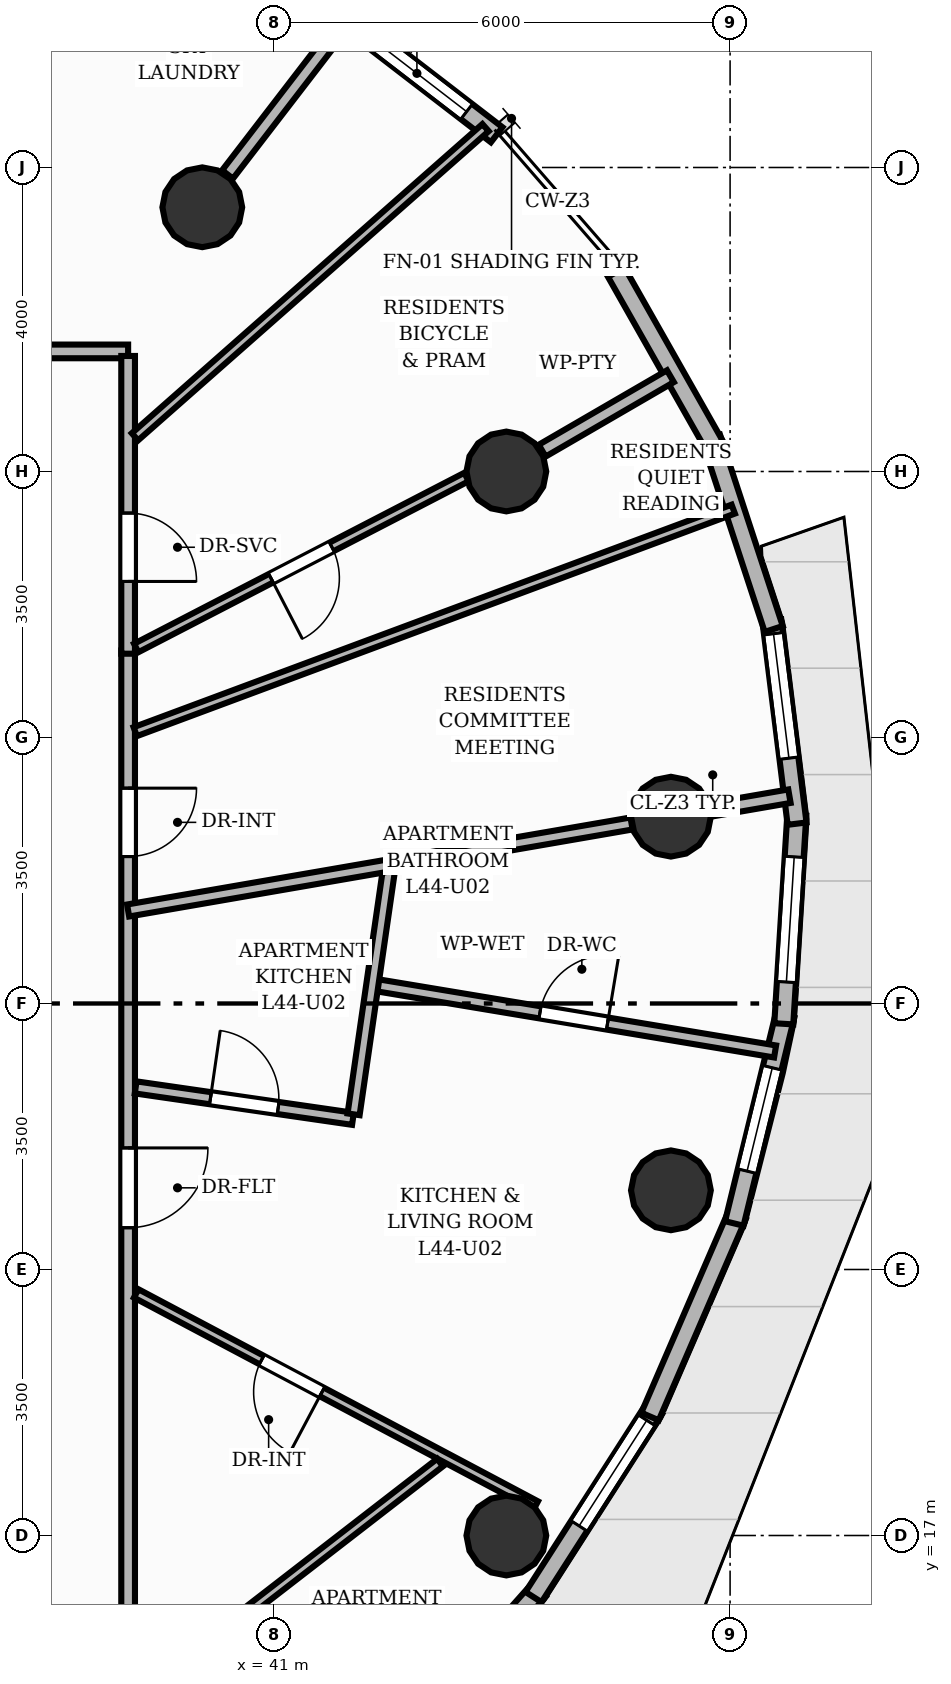
"""IFC4 building model, lengths in metres.
Left out: names, types, materials, properties, quantities, classifications, styles, units other than length and angle.
Written with IfcOpenShell. Run it as: python <this file> out.ifc"""

import sys

from ifc_helpers import new_model, si_unit, direction, frame, frame_2d, origin, origin_2d, place, context, subcontext, project, spatial, rectangle, circle, extrude, element, fill, save


model = new_model("IFC4")
c1 = context("Model", 3, precision=1e-05, world=origin(), true_north=direction((0.0, 1.0)))
c2 = subcontext(c1, "Body", "Model", "MODEL_VIEW")
j1 = project(units=[si_unit("LENGTHUNIT", "METRE"), si_unit("PLANEANGLEUNIT", "RADIAN")], contexts=[c1])
p1 = place(None, origin())
s1 = spatial("IfcSite", under=j1, at=p1, CompositionType="ELEMENT")
p2 = place(p1, origin())
s2 = spatial("IfcBuilding", under=s1, at=p2, CompositionType="ELEMENT")
p3 = place(p2, frame((0.0, 0.0, 148.96)))
s3 = spatial("IfcBuildingStorey", under=s2, at=p3, CompositionType="ELEMENT", Elevation=148.96)
for number, where, z_axis, x_axis in (
    (1, (46.221, 26.458, 0.0), (0.0, 0.0, 1.0), (1.0, 0.0, 0.0)),
    (2, (44.056, 31.0, 0.0), (0.0, 0.0, 1.0), (1.0, 0.0, 0.0)),
    (3, (40.056, 34.477, 0.0), (0.0, 0.0, 1.0), (1.0, 0.0, 0.0)),
    (4, (44.056, 17.0, 0.0), (0.0, 0.0, 1.0), (1.0, 0.0, 0.0)),
    (5, (46.221, 21.542, 0.0), (0.0, 0.0, 1.0), (1.0, 0.0, 0.0)),
):
    element("IfcColumn", number, at=place(p3, frame(where, z_axis=z_axis, x_axis=x_axis)), inside=s3, PredefinedType="COLUMN", context=c2, shape_type="SweptSolid", body=[
        extrude(circle(Radius=0.525, at=origin_2d()), origin(), (0.0, 0.0, 1.0), 3.2),
    ])
p4 = place(p3, frame((41.831, 37.046, 0.0), z_axis=(0.0, 0.0, 1.0), x_axis=(0.7923805969, -0.610027040103, 0.0)))
e6 = element("IfcWall", 6, at=p4, inside=s3, PredefinedType="SOLIDWALL", context=c2, shape_type="SweptSolid", body=[
    extrude(rectangle(XDim=2.648, YDim=0.25, at=frame_2d((1.324, 0.0))), origin(), (0.0, 0.0, 1.0), 2.96),
])
p5 = place(p4, frame((0.499, 0.0, 0.85)))
e7 = element("IfcOpeningElement", 7, at=p5, cuts=e6, PredefinedType="OPENING", context=c2, shape_type="SweptSolid", body=[
    extrude(rectangle(XDim=1.65, YDim=1.55, at=frame_2d((0.825, 0.775))), frame((0.0, 0.135, 0.0), z_axis=(0.0, -1.0, 0.0), x_axis=(1.0, 0.0, 0.0)), (0.0, 0.0, 1.0), 0.27),
])
p6 = place(p3, frame((44.48, 16.277, 0.0), z_axis=(0.0, 0.0, 1.0), x_axis=(-0.664002369324, -0.747730468506, 0.0)))
e8 = element("IfcWall", 8, at=p6, inside=s3, PredefinedType="SOLIDWALL", context=c2, shape_type="SweptSolid", body=[
    extrude(rectangle(XDim=2.977, YDim=0.25, at=frame_2d((1.489, 0.0))), origin(), (0.0, 0.0, 1.0), 2.96),
])
p7 = place(p3, frame((45.998, 18.663, 0.0), z_axis=(0.0, 0.0, 1.0), x_axis=(-0.539492373821, -0.841990486044, 0.0)))
e9 = element("IfcWall", 9, at=p7, inside=s3, PredefinedType="SOLIDWALL", context=c2, shape_type="SweptSolid", body=[
    extrude(rectangle(XDim=2.937, YDim=0.25, at=frame_2d((1.469, 0.0))), origin(), (0.0, 0.0, 1.0), 2.96),
])
p8 = place(p7, frame((0.175, 0.0, 0.85)))
e10 = element("IfcOpeningElement", 10, at=p8, cuts=e9, PredefinedType="OPENING", context=c2, shape_type="SweptSolid", body=[
    extrude(rectangle(XDim=1.65, YDim=1.55, at=frame_2d((0.825, 0.775))), frame((0.0, 0.135, 0.0), z_axis=(0.0, -1.0, 0.0), x_axis=(1.0, 0.0, 0.0)), (0.0, 0.0, 1.0), 0.27),
])
p9 = place(p3, frame((47.091, 21.211, 0.0), z_axis=(0.0, 0.0, 1.0), x_axis=(-0.397015319193, -0.917811983102, 0.0)))
e11 = element("IfcWall", 11, at=p9, inside=s3, PredefinedType="SOLIDWALL", context=c2, shape_type="SweptSolid", body=[
    extrude(rectangle(XDim=2.882, YDim=0.25, at=frame_2d((1.441, 0.0))), origin(), (0.0, 0.0, 1.0), 2.96),
])
p10 = place(p3, frame((47.723, 23.843, 0.0), z_axis=(0.0, 0.0, 1.0), x_axis=(-0.236986101123, -0.971513040507, 0.0)))
e12 = element("IfcWall", 12, at=p10, inside=s3, PredefinedType="SOLIDWALL", context=c2, shape_type="SweptSolid", body=[
    extrude(rectangle(XDim=2.818, YDim=0.25, at=frame_2d((1.409, 0.0))), origin(), (0.0, 0.0, 1.0), 2.96),
])
p11 = place(p10, frame((0.709, 0.0, 0.85)))
e13 = element("IfcOpeningElement", 13, at=p11, cuts=e12, PredefinedType="OPENING", context=c2, shape_type="SweptSolid", body=[
    extrude(rectangle(XDim=1.4, YDim=1.55, at=frame_2d((0.7, 0.775))), frame((0.0, 0.135, 0.0), z_axis=(0.0, -1.0, 0.0), x_axis=(1.0, 0.0, 0.0)), (0.0, 0.0, 1.0), 0.27),
])
p12 = place(p3, frame((47.878, 26.479, 0.0), z_axis=(0.0, 0.0, 1.0), x_axis=(-0.062278868317, -0.998058787127, 0.0)))
e14 = element("IfcWall", 14, at=p12, inside=s3, PredefinedType="SOLIDWALL", context=c2, shape_type="SweptSolid", body=[
    extrude(rectangle(XDim=2.752, YDim=0.25, at=frame_2d((1.376, 0.0))), origin(), (0.0, 0.0, 1.0), 2.96),
])
p13 = place(p12, frame((0.551, 0.0, 0.85)))
e15 = element("IfcOpeningElement", 15, at=p13, cuts=e14, PredefinedType="OPENING", context=c2, shape_type="SweptSolid", body=[
    extrude(rectangle(XDim=1.65, YDim=1.55, at=frame_2d((0.825, 0.775))), frame((0.0, 0.135, 0.0), z_axis=(0.0, -1.0, 0.0), x_axis=(1.0, 0.0, 0.0)), (0.0, 0.0, 1.0), 0.27),
])
p14 = place(p3, frame((47.549, 29.039, 0.0), z_axis=(0.0, 0.0, 1.0), x_axis=(0.123197890413, -0.992382123881, 0.0)))
e16 = element("IfcWall", 16, at=p14, inside=s3, PredefinedType="SOLIDWALL", context=c2, shape_type="SweptSolid", body=[
    extrude(rectangle(XDim=2.693, YDim=0.25, at=frame_2d((1.347, 0.0))), origin(), (0.0, 0.0, 1.0), 2.96),
])
p15 = place(p14, frame((0.175, 0.0, 0.85)))
e17 = element("IfcOpeningElement", 17, at=p15, cuts=e16, PredefinedType="OPENING", context=c2, shape_type="SweptSolid", body=[
    extrude(rectangle(XDim=1.65, YDim=1.55, at=frame_2d((0.825, 0.775))), frame((0.0, 0.135, 0.0), z_axis=(0.0, -1.0, 0.0), x_axis=(1.0, 0.0, 0.0)), (0.0, 0.0, 1.0), 0.27),
])
p16 = place(p3, frame((46.749, 31.444, 0.0), z_axis=(0.0, 0.0, 1.0), x_axis=(0.311522010952, -0.950238936633, 0.0)))
e18 = element("IfcWall", 18, at=p16, inside=s3, PredefinedType="SOLIDWALL", context=c2, shape_type="SweptSolid", body=[
    extrude(rectangle(XDim=2.648, YDim=0.25, at=frame_2d((1.324, 0.0))), origin(), (0.0, 0.0, 1.0), 2.96),
])
p17 = place(p3, frame((45.502, 33.623, 0.0), z_axis=(0.0, 0.0, 1.0), x_axis=(0.492909281161, -0.870080709214, 0.0)))
e19 = element("IfcWall", 19, at=p17, inside=s3, PredefinedType="SOLIDWALL", context=c2, shape_type="SweptSolid", body=[
    extrude(rectangle(XDim=2.624, YDim=0.25, at=frame_2d((1.312, 0.0))), origin(), (0.0, 0.0, 1.0), 2.96),
])
p18 = place(p3, frame((46.758, 26.551, 0.0), z_axis=(0.0, 0.0, 1.0), x_axis=(0.985390767806, 0.170308645474, 0.0)))
e20 = element("IfcWall", 20, at=p18, inside=s3, PredefinedType="PARTITIONING", context=c2, shape_type="SweptSolid", body=[
    extrude(rectangle(XDim=1.038, YDim=0.18, at=frame_2d((0.519, 0.0))), origin(), (0.0, 0.0, 1.0), 2.336),
])
p19 = place(p3, frame((44.528, 31.274, 0.0), z_axis=(0.0, 0.0, 1.0), x_axis=(0.864802971131, 0.502111363268, 0.0)))
e21 = element("IfcWall", 21, at=p19, inside=s3, PredefinedType="PARTITIONING", context=c2, shape_type="SweptSolid", body=[
    extrude(rectangle(XDim=1.951, YDim=0.18, at=frame_2d((0.975, 0.0))), origin(), (0.0, 0.0, 1.0), 2.336),
])
p20 = place(p3, frame((40.388, 34.908, 0.0), z_axis=(0.0, 0.0, 1.0), x_axis=(0.609556175004, 0.792742877303, 0.0)))
e22 = element("IfcWall", 22, at=p20, inside=s3, PredefinedType="PARTITIONING", context=c2, shape_type="SweptSolid", body=[
    extrude(rectangle(XDim=2.519, YDim=0.18, at=frame_2d((1.259, 0.0))), origin(), (0.0, 0.0, 1.0), 2.336),
])
p21 = place(p3, frame((39.08, 28.645, 0.0), z_axis=(0.0, 0.0, 1.0), x_axis=(0.0, -1.0, 0.0)))
e23 = element("IfcWall", 23, at=p21, inside=s3, PredefinedType="PARTITIONING", context=c2, shape_type="SweptSolid", body=[
    extrude(rectangle(XDim=13.225, YDim=0.18, at=frame_2d((6.613, 0.0))), origin(), (0.0, 0.0, 1.0), 2.955),
])
p22 = place(p21, frame((6.545, 0.0, 0.0)))
e24 = element("IfcOpeningElement", 24, at=p22, cuts=e23, PredefinedType="OPENING", context=c2, shape_type="SweptSolid", body=[
    extrude(rectangle(XDim=1.05, YDim=2.15, at=frame_2d((0.525, 1.075))), frame((0.0, 0.1, 0.0), z_axis=(0.0, -1.0, 0.0), x_axis=(1.0, 0.0, 0.0)), (0.0, 0.0, 1.0), 0.2),
])
p23 = place(p21, frame((1.812, 0.0, 0.0)))
e25 = element("IfcOpeningElement", 25, at=p23, cuts=e23, PredefinedType="OPENING", context=c2, shape_type="SweptSolid", body=[
    extrude(rectangle(XDim=0.9, YDim=2.1, at=frame_2d((0.45, 1.05))), frame((0.0, 0.1, 0.0), z_axis=(0.0, -1.0, 0.0), x_axis=(1.0, 0.0, 0.0)), (0.0, 0.0, 1.0), 0.2),
])
p24 = place(p3, frame((21.42, 32.58, 0.0), z_axis=(0.0, 0.0, 1.0), x_axis=(1.0, 0.0, 0.0)))
e26 = element("IfcWall", 26, at=p24, inside=s3, PredefinedType="PARTITIONING", context=c2, shape_type="SweptSolid", body=[
    extrude(rectangle(XDim=17.66, YDim=0.18, at=frame_2d((8.83, 0.0))), origin(), (0.0, 0.0, 1.0), 2.955),
])
p25 = place(p24, frame((13.001, 0.0, 0.0)))
e27 = element("IfcOpeningElement", 27, at=p25, cuts=e26, PredefinedType="OPENING", context=c2, shape_type="SweptSolid", body=[
    extrude(rectangle(XDim=0.9, YDim=2.1, at=frame_2d((0.45, 1.05))), frame((0.0, 0.1, 0.0), z_axis=(0.0, -1.0, 0.0), x_axis=(1.0, 0.0, 0.0)), (0.0, 0.0, 1.0), 0.2),
])
p26 = place(p24, frame((15.547, 0.0, 0.0)))
e28 = element("IfcOpeningElement", 28, at=p26, cuts=e26, PredefinedType="OPENING", context=c2, shape_type="SweptSolid", body=[
    extrude(rectangle(XDim=0.9, YDim=2.1, at=frame_2d((0.45, 1.05))), frame((0.0, 0.1, 0.0), z_axis=(0.0, -1.0, 0.0), x_axis=(1.0, 0.0, 0.0)), (0.0, 0.0, 1.0), 0.2),
])
p27 = place(p24, frame((5.757, 0.0, 0.0)))
e29 = element("IfcOpeningElement", 29, at=p27, cuts=e26, PredefinedType="OPENING", context=c2, shape_type="SweptSolid", body=[
    extrude(rectangle(XDim=1.05, YDim=2.15, at=frame_2d((0.525, 1.075))), frame((0.0, 0.1, 0.0), z_axis=(0.0, -1.0, 0.0), x_axis=(1.0, 0.0, 0.0)), (0.0, 0.0, 1.0), 0.2),
])
p28 = place(p3, frame((39.08, 32.52, 0.0), z_axis=(0.0, 0.0, 1.0), x_axis=(0.0, -1.0, 0.0)))
e30 = element("IfcWall", 30, at=p28, inside=s3, PredefinedType="PARTITIONING", context=c2, shape_type="SweptSolid", body=[
    extrude(rectangle(XDim=3.918, YDim=0.18, at=frame_2d((1.959, 0.0))), origin(), (0.0, 0.0, 1.0), 2.955),
])
p29 = place(p28, frame((2.067, 0.0, 0.0)))
e31 = element("IfcOpeningElement", 31, at=p29, cuts=e30, PredefinedType="OPENING", context=c2, shape_type="SweptSolid", body=[
    extrude(rectangle(XDim=0.9, YDim=2.1, at=frame_2d((0.45, 1.05))), frame((0.0, 0.1, 0.0), z_axis=(0.0, -1.0, 0.0), x_axis=(1.0, 0.0, 0.0)), (0.0, 0.0, 1.0), 0.2),
])
p30 = place(p3, frame((42.294, 24.25, 0.0), z_axis=(0.0, 0.0, 1.0), x_axis=(0.986430753195, -0.164177858287, 0.0)))
e32 = element("IfcWall", 32, at=p30, inside=s3, PredefinedType="PLUMBINGWALL", context=c2, shape_type="SweptSolid", body=[
    extrude(rectangle(XDim=5.371, YDim=0.16, at=frame_2d((2.686, 0.0))), origin(), (0.0, 0.0, 1.0), 2.955),
])
p31 = place(p30, frame((2.236, 0.0, 0.0)))
e33 = element("IfcOpeningElement", 33, at=p31, cuts=e32, PredefinedType="OPENING", context=c2, shape_type="SweptSolid", body=[
    extrude(rectangle(XDim=0.9, YDim=2.1, at=frame_2d((0.45, 1.05))), frame((0.0, 0.09, 0.0), z_axis=(0.0, -1.0, 0.0), x_axis=(1.0, 0.0, 0.0)), (0.0, 0.0, 1.0), 0.18),
])
p32 = place(p3, frame((44.443, 17.395, 0.0), z_axis=(0.0, 0.0, 1.0), x_axis=(-0.883258541518, 0.468886285612, 0.0)))
e34 = element("IfcWall", 34, at=p32, inside=s3, PredefinedType="PARTITIONING", context=c2, shape_type="SweptSolid", body=[
    extrude(rectangle(XDim=5.952, YDim=0.125, at=frame_2d((2.976, 0.0))), origin(), (0.0, 0.0, 1.0), 2.955),
])
p33 = place(p32, frame((3.184, 0.0, 0.0)))
e35 = element("IfcOpeningElement", 35, at=p33, cuts=e34, PredefinedType="OPENING", context=c2, shape_type="SweptSolid", body=[
    extrude(rectangle(XDim=0.9, YDim=2.1, at=frame_2d((0.45, 1.05))), frame((0.0, 0.073, 0.0), z_axis=(0.0, -1.0, 0.0), x_axis=(1.0, 0.0, 0.0)), (0.0, 0.0, 1.0), 0.145),
])
p34 = place(p3, frame((39.179, 22.896, 0.0), z_axis=(0.0, 0.0, 1.0), x_axis=(0.989697773488, -0.143172333756, 0.0)))
e36 = element("IfcWall", 36, at=p34, inside=s3, PredefinedType="PLUMBINGWALL", context=c2, shape_type="SweptSolid", body=[
    extrude(rectangle(XDim=2.889, YDim=0.16, at=frame_2d((1.444, 0.0))), origin(), (0.0, 0.0, 1.0), 2.336),
])
p35 = place(p34, frame((0.994, 0.0, 0.0)))
e37 = element("IfcOpeningElement", 37, at=p35, cuts=e36, PredefinedType="OPENING", context=c2, shape_type="SweptSolid", body=[
    extrude(rectangle(XDim=0.9, YDim=2.1, at=frame_2d((0.45, 1.05))), frame((0.0, 0.09, 0.0), z_axis=(0.0, -1.0, 0.0), x_axis=(1.0, 0.0, 0.0)), (0.0, 0.0, 1.0), 0.18),
])
p36 = place(p3, frame((42.046, 22.542, 0.0), z_axis=(0.0, 0.0, 1.0), x_axis=(0.143217612057, 0.98969122235, 0.0)))
e38 = element("IfcWall", 38, at=p36, inside=s3, PredefinedType="PLUMBINGWALL", context=c2, shape_type="SweptSolid", body=[
    extrude(rectangle(XDim=3.311, YDim=0.16, at=frame_2d((1.655, 0.0))), origin(), (0.0, 0.0, 1.0), 2.955),
])
p37 = place(p3, frame((39.08, 25.224, 0.0), z_axis=(0.0, 0.0, 1.0), x_axis=(0.985384524795, 0.17034476304, 0.0)))
e39 = element("IfcWall", 39, at=p37, inside=s3, PredefinedType="PLUMBINGWALL", context=c2, shape_type="SweptSolid", body=[
    extrude(rectangle(XDim=6.722, YDim=0.16, at=frame_2d((3.361, 0.0))), origin(), (0.0, 0.0, 1.0), 2.336),
])
p38 = place(p3, frame((43.184, 17.96, 0.0), z_axis=(0.0, 0.0, 1.0), x_axis=(-0.790862802872, -0.611993486104, 0.0)))
e40 = element("IfcWall", 40, at=p38, inside=s3, PredefinedType="PARTITIONING", context=c2, shape_type="SweptSolid", body=[
    extrude(rectangle(XDim=9.975, YDim=0.125, at=frame_2d((4.987, 0.0))), origin(), (0.0, 0.0, 1.0), 2.411),
])
p39 = place(p38, frame((3.417, 0.0, 0.0)))
e41 = element("IfcOpeningElement", 41, at=p39, cuts=e40, PredefinedType="OPENING", context=c2, shape_type="SweptSolid", body=[
    extrude(rectangle(XDim=0.9, YDim=2.1, at=frame_2d((0.45, 1.05))), frame((0.0, 0.073, 0.0), z_axis=(0.0, -1.0, 0.0), x_axis=(1.0, 0.0, 0.0)), (0.0, 0.0, 1.0), 0.145),
])
p40 = place(p3, frame((38.951, 38.323, 0.0), z_axis=(0.0, 0.0, 1.0), x_axis=(-0.484039777335, -0.875045995338, 0.0)))
e42 = element("IfcWall", 42, at=p40, inside=s3, PredefinedType="PARTITIONING", context=c2, shape_type="SweptSolid", body=[
    extrude(rectangle(XDim=6.442, YDim=0.125, at=frame_2d((3.221, 0.0))), origin(), (0.0, 0.0, 1.0), 2.955),
])
p41 = place(p3, frame((43.783, 35.524, 0.0), z_axis=(0.0, 0.0, 1.0), x_axis=(-0.750018545151, -0.661416798947, 0.0)))
e43 = element("IfcWall", 43, at=p41, inside=s3, PredefinedType="PARTITIONING", context=c2, shape_type="SweptSolid", body=[
    extrude(rectangle(XDim=6.15, YDim=0.125, at=frame_2d((3.075, 0.0))), origin(), (0.0, 0.0, 1.0), 2.692),
])
p42 = place(p3, frame((43.531, 30.927, 0.0), z_axis=(0.0, 0.0, 1.0), x_axis=(-0.888041341995, -0.459763607638, 0.0)))
e44 = element("IfcWall", 44, at=p42, inside=s3, PredefinedType="PARTITIONING", context=c2, shape_type="SweptSolid", body=[
    extrude(rectangle(XDim=4.893, YDim=0.125, at=frame_2d((2.446, 0.0))), origin(), (0.0, 0.0, 1.0), 2.336),
])
p43 = place(p42, frame((1.996, 0.0, 0.0)))
e45 = element("IfcOpeningElement", 45, at=p43, cuts=e44, PredefinedType="OPENING", context=c2, shape_type="SweptSolid", body=[
    extrude(rectangle(XDim=0.9, YDim=2.1, at=frame_2d((0.45, 1.05))), frame((0.0, 0.073, 0.0), z_axis=(0.0, -1.0, 0.0), x_axis=(1.0, 0.0, 0.0)), (0.0, 0.0, 1.0), 0.145),
])
p44 = place(p3, frame((39.174, 27.577, 0.0), z_axis=(0.0, 0.0, 1.0), x_axis=(0.9372070401, 0.348773513883, 0.0)))
e46 = element("IfcWall", 46, at=p44, inside=s3, PredefinedType="PARTITIONING", context=c2, shape_type="SweptSolid", body=[
    extrude(rectangle(XDim=8.395, YDim=0.125, at=frame_2d((4.198, 0.0))), origin(), (0.0, 0.0, 1.0), 2.692),
])
p45 = place(p5, origin())
e47 = element("IfcWindow", 47, at=p45, inside=s3, PartitioningType="SINGLE_PANEL", PredefinedType="WINDOW", context=c2, shape_type="SweptSolid", body=[
    extrude(rectangle(XDim=1.65, YDim=1.55, at=frame_2d((0.825, 0.775))), frame((0.0, 0.03, 0.0), z_axis=(0.0, -1.0, 0.0), x_axis=(1.0, 0.0, 0.0)), (0.0, 0.0, 1.0), 0.06),
])
fill(e7, e47)
p46 = place(p8, origin())
e48 = element("IfcWindow", 48, at=p46, inside=s3, PartitioningType="SINGLE_PANEL", PredefinedType="WINDOW", context=c2, shape_type="SweptSolid", body=[
    extrude(rectangle(XDim=1.65, YDim=1.55, at=frame_2d((0.825, 0.775))), frame((0.0, 0.03, 0.0), z_axis=(0.0, -1.0, 0.0), x_axis=(1.0, 0.0, 0.0)), (0.0, 0.0, 1.0), 0.06),
])
fill(e10, e48)
p47 = place(p11, origin())
e49 = element("IfcWindow", 49, at=p47, inside=s3, PartitioningType="SINGLE_PANEL", PredefinedType="WINDOW", context=c2, shape_type="SweptSolid", body=[
    extrude(rectangle(XDim=1.4, YDim=1.55, at=frame_2d((0.7, 0.775))), frame((0.0, 0.03, 0.0), z_axis=(0.0, -1.0, 0.0), x_axis=(1.0, 0.0, 0.0)), (0.0, 0.0, 1.0), 0.06),
])
fill(e13, e49)
p48 = place(p13, origin())
e50 = element("IfcWindow", 50, at=p48, inside=s3, PartitioningType="SINGLE_PANEL", PredefinedType="WINDOW", context=c2, shape_type="SweptSolid", body=[
    extrude(rectangle(XDim=1.65, YDim=1.55, at=frame_2d((0.825, 0.775))), frame((0.0, 0.03, 0.0), z_axis=(0.0, -1.0, 0.0), x_axis=(1.0, 0.0, 0.0)), (0.0, 0.0, 1.0), 0.06),
])
fill(e15, e50)
p49 = place(p15, origin())
e51 = element("IfcWindow", 51, at=p49, inside=s3, PartitioningType="SINGLE_PANEL", PredefinedType="WINDOW", context=c2, shape_type="SweptSolid", body=[
    extrude(rectangle(XDim=1.65, YDim=1.55, at=frame_2d((0.825, 0.775))), frame((0.0, 0.03, 0.0), z_axis=(0.0, -1.0, 0.0), x_axis=(1.0, 0.0, 0.0)), (0.0, 0.0, 1.0), 0.06),
])
fill(e17, e51)
p50 = place(p22, origin())
e52 = element("IfcDoor", 52, at=p50, inside=s3, OperationType="SINGLE_SWING_LEFT", PredefinedType="DOOR", context=c2, shape_type="SweptSolid", body=[
    extrude(rectangle(XDim=1.05, YDim=2.15, at=frame_2d((0.525, 1.075))), frame((0.0, 0.025, 0.0), z_axis=(0.0, -1.0, 0.0), x_axis=(1.0, 0.0, 0.0)), (0.0, 0.0, 1.0), 0.05),
])
fill(e24, e52)
p51 = place(p31, origin())
e53 = element("IfcDoor", 53, at=p51, inside=s3, OperationType="SINGLE_SWING_RIGHT", PredefinedType="DOOR", context=c2, shape_type="SweptSolid", body=[
    extrude(rectangle(XDim=0.9, YDim=2.1, at=frame_2d((0.45, 1.05))), frame((0.0, 0.025, 0.0), z_axis=(0.0, -1.0, 0.0), x_axis=(1.0, 0.0, 0.0)), (0.0, 0.0, 1.0), 0.05),
])
fill(e33, e53)
p52 = place(p33, origin())
e54 = element("IfcDoor", 54, at=p52, inside=s3, OperationType="SINGLE_SWING_LEFT", PredefinedType="DOOR", context=c2, shape_type="SweptSolid", body=[
    extrude(rectangle(XDim=0.9, YDim=2.1, at=frame_2d((0.45, 1.05))), frame((0.0, 0.025, 0.0), z_axis=(0.0, -1.0, 0.0), x_axis=(1.0, 0.0, 0.0)), (0.0, 0.0, 1.0), 0.05),
])
fill(e35, e54)
p53 = place(p35, origin())
e55 = element("IfcDoor", 55, at=p53, inside=s3, OperationType="SINGLE_SWING_LEFT", PredefinedType="DOOR", context=c2, shape_type="SweptSolid", body=[
    extrude(rectangle(XDim=0.9, YDim=2.1, at=frame_2d((0.45, 1.05))), frame((0.0, 0.025, 0.0), z_axis=(0.0, -1.0, 0.0), x_axis=(1.0, 0.0, 0.0)), (0.0, 0.0, 1.0), 0.05),
])
fill(e37, e55)
p54 = place(p29, origin())
e56 = element("IfcDoor", 56, at=p54, inside=s3, OperationType="SINGLE_SWING_RIGHT", PredefinedType="DOOR", context=c2, shape_type="SweptSolid", body=[
    extrude(rectangle(XDim=0.9, YDim=2.1, at=frame_2d((0.45, 1.05))), frame((0.0, 0.025, 0.0), z_axis=(0.0, -1.0, 0.0), x_axis=(1.0, 0.0, 0.0)), (0.0, 0.0, 1.0), 0.05),
])
fill(e31, e56)
p55 = place(p23, origin())
e57 = element("IfcDoor", 57, at=p55, inside=s3, OperationType="SINGLE_SWING_LEFT", PredefinedType="DOOR", context=c2, shape_type="SweptSolid", body=[
    extrude(rectangle(XDim=0.9, YDim=2.1, at=frame_2d((0.45, 1.05))), frame((0.0, 0.025, 0.0), z_axis=(0.0, -1.0, 0.0), x_axis=(1.0, 0.0, 0.0)), (0.0, 0.0, 1.0), 0.05),
])
fill(e25, e57)
p56 = place(p43, origin())
e58 = element("IfcDoor", 58, at=p56, inside=s3, OperationType="SINGLE_SWING_RIGHT", PredefinedType="DOOR", context=c2, shape_type="SweptSolid", body=[
    extrude(rectangle(XDim=0.9, YDim=2.1, at=frame_2d((0.45, 1.05))), frame((0.0, 0.025, 0.0), z_axis=(0.0, -1.0, 0.0), x_axis=(1.0, 0.0, 0.0)), (0.0, 0.0, 1.0), 0.05),
])
fill(e45, e58)
save(model, sys.argv[1])
